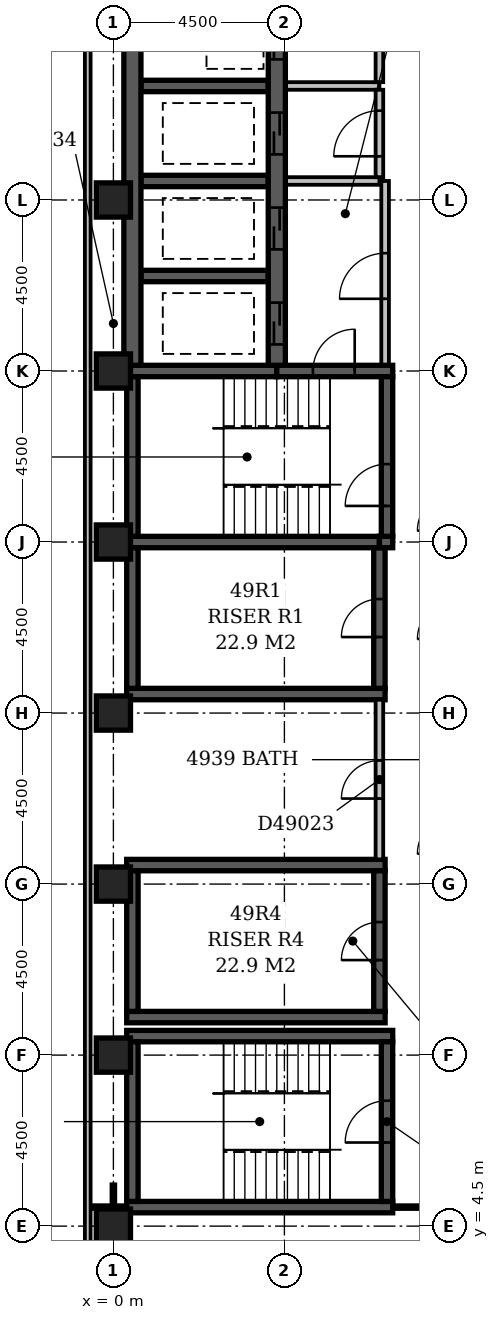
"""IFC4 building model, lengths in metres.
Left out: names, types, materials, properties, quantities, classifications, styles, units other than length and angle.
Written with IfcOpenShell. Run it as: python <this file> out.ifc"""

import sys

from ifc_helpers import new_model, si_unit, direction, frame, frame_2d, origin, origin_2d, place, context, subcontext, project, spatial, rectangle, extrude, element, fill, save


model = new_model("IFC4")
c1 = context("Model", 3, precision=1e-05, world=origin(), true_north=direction((0.0, 1.0)))
c2 = subcontext(c1, "Body", "Model", "MODEL_VIEW")
j1 = project(units=[si_unit("LENGTHUNIT", "METRE"), si_unit("PLANEANGLEUNIT", "RADIAN")], contexts=[c1])
p1 = place(None, origin())
s1 = spatial("IfcSite", under=j1, at=p1, CompositionType="ELEMENT")
p2 = place(p1, origin())
s2 = spatial("IfcBuilding", under=s1, at=p2, CompositionType="ELEMENT")
p3 = place(p2, frame((0.0, 0.0, 193.4)))
s3 = spatial("IfcBuildingStorey", under=s2, at=p3, CompositionType="ELEMENT", Elevation=193.4)
for number, where, z_axis, x_axis in (
    (1, (0.35, 5.0, -0.3), (0.0, 0.0, 1.0), (1.0, 0.0, 0.0)),
    (2, (0.35, 9.5, -0.3), (0.0, 0.0, 1.0), (1.0, 0.0, 0.0)),
):
    element("IfcWall", number, at=place(p3, frame(where, z_axis=z_axis, x_axis=x_axis)), inside=s3, PredefinedType="SHEAR", context=c2, shape_type="SweptSolid", body=[
        extrude(rectangle(XDim=7.0, YDim=0.3, at=frame_2d((3.5, 0.0))), origin(), (0.0, 0.0, 1.0), 3.6),
    ])
for number, where, z_axis, x_axis in (
    (3, (0.35, 10.0, -0.3), (0.0, 0.0, 1.0), (1.0, 0.0, 0.0)),
    (4, (0.35, 14.0, -0.3), (0.0, 0.0, 1.0), (1.0, 0.0, 0.0)),
    (5, (0.35, 18.5, -0.3), (0.0, 0.0, 1.0), (1.0, 0.0, 0.0)),
):
    element("IfcWall", number, at=place(p3, frame(where, z_axis=z_axis, x_axis=x_axis)), inside=s3, PredefinedType="SHEAR", context=c2, shape_type="SweptSolid", body=[
        extrude(rectangle(XDim=6.8, YDim=0.3, at=frame_2d((3.4, 0.0))), origin(), (0.0, 0.0, 1.0), 3.6),
    ])
p4 = place(p3, frame((0.35, 22.5, -0.3), z_axis=(0.0, 0.0, 1.0), x_axis=(1.0, 0.0, 0.0)))
e6 = element("IfcWall", 6, at=p4, inside=s3, PredefinedType="SHEAR", context=c2, shape_type="SweptSolid", body=[
    extrude(rectangle(XDim=6.65, YDim=0.3, at=frame_2d((3.325, 0.0))), origin(), (0.0, 0.0, 1.0), 3.6),
])
p5 = place(p3, frame((0.35, 27.0, -0.3), z_axis=(0.0, 0.0, 1.0), x_axis=(1.0, 0.0, 0.0)))
e7 = element("IfcWall", 7, at=p5, inside=s3, PredefinedType="SHEAR", context=c2, shape_type="SweptSolid", body=[
    extrude(rectangle(XDim=3.95, YDim=0.3, at=frame_2d((1.975, 0.0))), origin(), (0.0, 0.0, 1.0), 3.6),
])
p6 = place(p3, frame((0.5, 5.15, -0.3), z_axis=(0.0, 0.0, 1.0), x_axis=(0.0, 1.0, 0.0)))
e8 = element("IfcWall", 8, at=p6, inside=s3, PredefinedType="SHEAR", context=c2, shape_type="SweptSolid", body=[
    extrude(rectangle(XDim=4.2, YDim=0.3, at=frame_2d((2.1, 0.0))), origin(), (0.0, 0.0, 1.0), 3.6),
])
for number, where, z_axis, x_axis in (
    (9, (0.5, 10.15, -0.3), (0.0, 0.0, 1.0), (0.0, 1.0, 0.0)),
    (10, (0.5, 18.65, -0.3), (0.0, 0.0, 1.0), (0.0, 1.0, 0.0)),
):
    element("IfcWall", number, at=place(p3, frame(where, z_axis=z_axis, x_axis=x_axis)), inside=s3, PredefinedType="SHEAR", context=c2, shape_type="SweptSolid", body=[
        extrude(rectangle(XDim=3.7, YDim=0.3, at=frame_2d((1.85, 0.0))), origin(), (0.0, 0.0, 1.0), 3.6),
    ])
p7 = place(p3, frame((0.5, 22.65, -0.3), z_axis=(0.0, 0.0, 1.0), x_axis=(0.0, 1.0, 0.0)))
e11 = element("IfcWall", 11, at=p7, inside=s3, PredefinedType="SHEAR", context=c2, shape_type="SweptSolid", body=[
    extrude(rectangle(XDim=4.2, YDim=0.3, at=frame_2d((2.1, 0.0))), origin(), (0.0, 0.0, 1.0), 3.6),
])
p8 = place(p3, frame((0.5, 27.15, -0.3), z_axis=(0.0, 0.0, 1.0), x_axis=(0.0, 1.0, 0.0)))
e12 = element("IfcWall", 12, at=p8, inside=s3, PredefinedType="SHEAR", context=c2, shape_type="SweptSolid", body=[
    extrude(rectangle(XDim=22.125, YDim=0.45, at=frame_2d((11.062, 0.0))), origin(), (0.0, 0.0, 1.0), 3.6),
])
for number, where, z_axis, x_axis in (
    (13, (0.725, 29.5, -0.3), (0.0, 0.0, 1.0), (1.0, 0.0, 0.0)),
    (14, (0.725, 32.0, -0.3), (0.0, 0.0, 1.0), (1.0, 0.0, 0.0)),
    (15, (0.725, 34.5, -0.3), (0.0, 0.0, 1.0), (1.0, 0.0, 0.0)),
):
    element("IfcWall", number, at=place(p3, frame(where, z_axis=z_axis, x_axis=x_axis)), inside=s3, PredefinedType="SHEAR", context=c2, shape_type="SweptSolid", body=[
        extrude(rectangle(XDim=3.35, YDim=0.3, at=frame_2d((1.675, 0.0))), origin(), (0.0, 0.0, 1.0), 3.6),
    ])
p9 = place(p3, frame((4.3, 27.0, -0.3), z_axis=(0.0, 0.0, 1.0), x_axis=(1.0, 0.0, 0.0)))
e16 = element("IfcWall", 16, at=p9, inside=s3, PredefinedType="SHEAR", context=c2, shape_type="SweptSolid", body=[
    extrude(rectangle(XDim=3.05, YDim=0.3, at=frame_2d((1.525, 0.0))), origin(), (0.0, 0.0, 1.0), 3.6),
])
p10 = place(p9, frame((0.95, 0.0, 0.3)))
e17 = element("IfcOpeningElement", 17, at=p10, cuts=e16, PredefinedType="OPENING", context=c2, shape_type="SweptSolid", body=[
    extrude(rectangle(XDim=1.1, YDim=2.1, at=frame_2d((0.55, 1.05))), frame((0.0, 0.162, 0.0), z_axis=(0.0, -1.0, 0.0), x_axis=(1.0, 0.0, 0.0)), (0.0, 0.0, 1.0), 0.324),
])
p11 = place(p3, frame((4.3, 27.15, -0.3), z_axis=(0.0, 0.0, 1.0), x_axis=(0.0, 1.0, 0.0)))
e18 = element("IfcWall", 18, at=p11, inside=s3, PredefinedType="SHEAR", context=c2, shape_type="SweptSolid", body=[
    extrude(rectangle(XDim=22.125, YDim=0.45, at=frame_2d((11.062, 0.0))), origin(), (0.0, 0.0, 1.0), 3.6),
])
p12 = place(p11, frame((3.05, 0.0, 0.3)))
e19 = element("IfcOpeningElement", 19, at=p12, cuts=e18, PredefinedType="OPENING", context=c2, shape_type="SweptSolid", body=[
    extrude(rectangle(XDim=1.1, YDim=2.1, at=frame_2d((0.55, 1.05))), frame((0.0, 0.237, 0.0), z_axis=(0.0, -1.0, 0.0), x_axis=(1.0, 0.0, 0.0)), (0.0, 0.0, 1.0), 0.474),
])
p13 = place(p11, frame((0.55, 0.0, 0.3)))
e20 = element("IfcOpeningElement", 20, at=p13, cuts=e18, PredefinedType="OPENING", context=c2, shape_type="SweptSolid", body=[
    extrude(rectangle(XDim=1.1, YDim=2.1, at=frame_2d((0.55, 1.05))), frame((0.0, 0.237, 0.0), z_axis=(0.0, -1.0, 0.0), x_axis=(1.0, 0.0, 0.0)), (0.0, 0.0, 1.0), 0.474),
])
p14 = place(p11, frame((20.55, 0.0, 0.3)))
e21 = element("IfcOpeningElement", 21, at=p14, cuts=e18, PredefinedType="OPENING", context=c2, shape_type="SweptSolid", body=[
    extrude(rectangle(XDim=1.1, YDim=2.1, at=frame_2d((0.55, 1.05))), frame((0.0, 0.237, 0.0), z_axis=(0.0, -1.0, 0.0), x_axis=(1.0, 0.0, 0.0)), (0.0, 0.0, 1.0), 0.474),
])
p15 = place(p11, frame((18.05, 0.0, 0.3)))
e22 = element("IfcOpeningElement", 22, at=p15, cuts=e18, PredefinedType="OPENING", context=c2, shape_type="SweptSolid", body=[
    extrude(rectangle(XDim=1.1, YDim=2.1, at=frame_2d((0.55, 1.05))), frame((0.0, 0.237, 0.0), z_axis=(0.0, -1.0, 0.0), x_axis=(1.0, 0.0, 0.0)), (0.0, 0.0, 1.0), 0.474),
])
p16 = place(p11, frame((15.55, 0.0, 0.3)))
e23 = element("IfcOpeningElement", 23, at=p16, cuts=e18, PredefinedType="OPENING", context=c2, shape_type="SweptSolid", body=[
    extrude(rectangle(XDim=1.1, YDim=2.1, at=frame_2d((0.55, 1.05))), frame((0.0, 0.237, 0.0), z_axis=(0.0, -1.0, 0.0), x_axis=(1.0, 0.0, 0.0)), (0.0, 0.0, 1.0), 0.474),
])
p17 = place(p11, frame((13.05, 0.0, 0.3)))
e24 = element("IfcOpeningElement", 24, at=p17, cuts=e18, PredefinedType="OPENING", context=c2, shape_type="SweptSolid", body=[
    extrude(rectangle(XDim=1.1, YDim=2.1, at=frame_2d((0.55, 1.05))), frame((0.0, 0.237, 0.0), z_axis=(0.0, -1.0, 0.0), x_axis=(1.0, 0.0, 0.0)), (0.0, 0.0, 1.0), 0.474),
])
p18 = place(p11, frame((10.55, 0.0, 0.3)))
e25 = element("IfcOpeningElement", 25, at=p18, cuts=e18, PredefinedType="OPENING", context=c2, shape_type="SweptSolid", body=[
    extrude(rectangle(XDim=1.1, YDim=2.1, at=frame_2d((0.55, 1.05))), frame((0.0, 0.237, 0.0), z_axis=(0.0, -1.0, 0.0), x_axis=(1.0, 0.0, 0.0)), (0.0, 0.0, 1.0), 0.474),
])
p19 = place(p11, frame((8.05, 0.0, 0.3)))
e26 = element("IfcOpeningElement", 26, at=p19, cuts=e18, PredefinedType="OPENING", context=c2, shape_type="SweptSolid", body=[
    extrude(rectangle(XDim=1.1, YDim=2.1, at=frame_2d((0.55, 1.05))), frame((0.0, 0.237, 0.0), z_axis=(0.0, -1.0, 0.0), x_axis=(1.0, 0.0, 0.0)), (0.0, 0.0, 1.0), 0.474),
])
p20 = place(p11, frame((5.55, 0.0, 0.3)))
e27 = element("IfcOpeningElement", 27, at=p20, cuts=e18, PredefinedType="OPENING", context=c2, shape_type="SweptSolid", body=[
    extrude(rectangle(XDim=1.1, YDim=2.1, at=frame_2d((0.55, 1.05))), frame((0.0, 0.237, 0.0), z_axis=(0.0, -1.0, 0.0), x_axis=(1.0, 0.0, 0.0)), (0.0, 0.0, 1.0), 0.474),
])
p21 = place(p3, frame((7.0, 10.15, -0.3), z_axis=(0.0, 0.0, 1.0), x_axis=(0.0, 1.0, 0.0)))
e28 = element("IfcWall", 28, at=p21, inside=s3, PredefinedType="SHEAR", context=c2, shape_type="SweptSolid", body=[
    extrude(rectangle(XDim=3.7, YDim=0.3, at=frame_2d((1.85, 0.0))), origin(), (0.0, 0.0, 1.0), 3.6),
])
p22 = place(p21, frame((1.35, 0.0, 0.3)))
e29 = element("IfcOpeningElement", 29, at=p22, cuts=e28, PredefinedType="OPENING", context=c2, shape_type="SweptSolid", body=[
    extrude(rectangle(XDim=1.0, YDim=2.1, at=frame_2d((0.5, 1.05))), frame((0.0, 0.162, 0.0), z_axis=(0.0, -1.0, 0.0), x_axis=(1.0, 0.0, 0.0)), (0.0, 0.0, 1.0), 0.324),
])
p23 = place(p3, frame((7.0, 18.65, -0.3), z_axis=(0.0, 0.0, 1.0), x_axis=(0.0, 1.0, 0.0)))
e30 = element("IfcWall", 30, at=p23, inside=s3, PredefinedType="SHEAR", context=c2, shape_type="SweptSolid", body=[
    extrude(rectangle(XDim=3.7, YDim=0.3, at=frame_2d((1.85, 0.0))), origin(), (0.0, 0.0, 1.0), 3.6),
])
p24 = place(p23, frame((1.35, 0.0, 0.3)))
e31 = element("IfcOpeningElement", 31, at=p24, cuts=e30, PredefinedType="OPENING", context=c2, shape_type="SweptSolid", body=[
    extrude(rectangle(XDim=1.0, YDim=2.1, at=frame_2d((0.5, 1.05))), frame((0.0, 0.162, 0.0), z_axis=(0.0, -1.0, 0.0), x_axis=(1.0, 0.0, 0.0)), (0.0, 0.0, 1.0), 0.324),
])
p25 = place(p3, frame((7.0, 22.5, -0.3), z_axis=(0.0, 0.0, 1.0), x_axis=(1.0, 0.0, 0.0)))
e32 = element("IfcWall", 32, at=p25, inside=s3, PredefinedType="SHEAR", context=c2, shape_type="SweptSolid", body=[
    extrude(rectangle(XDim=0.35, YDim=0.3, at=frame_2d((0.175, 0.0))), origin(), (0.0, 0.0, 1.0), 3.6),
])
p26 = place(p3, frame((7.2, 5.15, -0.3), z_axis=(0.0, 0.0, 1.0), x_axis=(0.0, 1.0, 0.0)))
e33 = element("IfcWall", 33, at=p26, inside=s3, PredefinedType="SHEAR", context=c2, shape_type="SweptSolid", body=[
    extrude(rectangle(XDim=4.2, YDim=0.3, at=frame_2d((2.1, 0.0))), origin(), (0.0, 0.0, 1.0), 3.6),
])
p27 = place(p26, frame((1.55, 0.0, 0.3)))
e34 = element("IfcOpeningElement", 34, at=p27, cuts=e33, PredefinedType="OPENING", context=c2, shape_type="SweptSolid", body=[
    extrude(rectangle(XDim=1.1, YDim=2.1, at=frame_2d((0.55, 1.05))), frame((0.0, 0.162, 0.0), z_axis=(0.0, -1.0, 0.0), x_axis=(1.0, 0.0, 0.0)), (0.0, 0.0, 1.0), 0.324),
])
p28 = place(p3, frame((7.2, 22.65, -0.3), z_axis=(0.0, 0.0, 1.0), x_axis=(0.0, 1.0, 0.0)))
e35 = element("IfcWall", 35, at=p28, inside=s3, PredefinedType="SHEAR", context=c2, shape_type="SweptSolid", body=[
    extrude(rectangle(XDim=4.2, YDim=0.3, at=frame_2d((2.1, 0.0))), origin(), (0.0, 0.0, 1.0), 3.6),
])
p29 = place(p28, frame((0.8, 0.0, 0.3)))
e36 = element("IfcOpeningElement", 36, at=p29, cuts=e35, PredefinedType="OPENING", context=c2, shape_type="SweptSolid", body=[
    extrude(rectangle(XDim=1.1, YDim=2.1, at=frame_2d((0.55, 1.05))), frame((0.0, 0.162, 0.0), z_axis=(0.0, -1.0, 0.0), x_axis=(1.0, 0.0, 0.0)), (0.0, 0.0, 1.0), 0.324),
])
for number, where, z_axis, x_axis in (
    (37, (0.0, 4.5, -0.3), (0.0, 0.0, 1.0), (1.0, 0.0, 0.0)),
    (38, (0.0, 9.0, -0.3), (0.0, 0.0, 1.0), (1.0, 0.0, 0.0)),
    (39, (0.0, 13.5, -0.3), (0.0, 0.0, 1.0), (1.0, 0.0, 0.0)),
    (40, (0.0, 18.0, -0.3), (0.0, 0.0, 1.0), (1.0, 0.0, 0.0)),
    (41, (0.0, 22.5, -0.3), (0.0, 0.0, 1.0), (1.0, 0.0, 0.0)),
    (42, (0.0, 27.0, -0.3), (0.0, 0.0, 1.0), (1.0, 0.0, 0.0)),
    (43, (0.0, 31.5, -0.3), (0.0, 0.0, 1.0), (1.0, 0.0, 0.0)),
):
    element("IfcColumn", number, at=place(p3, frame(where, z_axis=z_axis, x_axis=x_axis)), inside=s3, PredefinedType="COLUMN", context=c2, shape_type="SweptSolid", body=[
        extrude(rectangle(XDim=0.9, YDim=0.9, at=origin_2d()), origin(), (0.0, 0.0, 1.0), 3.6),
    ])
p30 = place(p3, frame((-0.675, 59.1, 0.0), z_axis=(0.0, 0.0, 1.0), x_axis=(0.0, -1.0, 0.0)))
e44 = element("IfcWall", 44, at=p30, inside=s3, PredefinedType="STANDARD", context=c2, shape_type="SweptSolid", body=[
    extrude(rectangle(XDim=55.35, YDim=0.15, at=frame_2d((27.675, 0.0))), origin(), (0.0, 0.0, 1.0), 2.7),
])
p31 = place(p3, frame((4.545, 34.5, 0.0), z_axis=(0.0, 0.0, 1.0), x_axis=(1.0, 0.0, 0.0)))
e45 = element("IfcWall", 45, at=p31, inside=s3, PredefinedType="PARTITIONING", context=c2, shape_type="SweptSolid", body=[
    extrude(rectangle(XDim=2.455, YDim=0.2, at=frame_2d((1.228, 0.0))), origin(), (0.0, 0.0, 1.0), 3.3),
])
p32 = place(p3, frame((7.0, 34.6, 0.0), z_axis=(0.0, 0.0, 1.0), x_axis=(0.0, 1.0, 0.0)))
e46 = element("IfcWall", 46, at=p32, inside=s3, PredefinedType="PARTITIONING", context=c2, shape_type="SweptSolid", body=[
    extrude(rectangle(XDim=14.9, YDim=0.2, at=frame_2d((7.45, 0.0))), origin(), (0.0, 0.0, 1.0), 3.3),
])
p33 = place(p32, frame((2.8, 0.0, 0.0)))
e47 = element("IfcOpeningElement", 47, at=p33, cuts=e46, PredefinedType="OPENING", context=c2, shape_type="SweptSolid", body=[
    extrude(rectangle(XDim=1.2, YDim=2.1, at=frame_2d((0.6, 1.05))), frame((0.0, 0.112, 0.0), z_axis=(0.0, -1.0, 0.0), x_axis=(1.0, 0.0, 0.0)), (0.0, 0.0, 1.0), 0.224),
])
p34 = place(p32, frame((9.8, 0.0, 0.0)))
e48 = element("IfcOpeningElement", 48, at=p34, cuts=e46, PredefinedType="OPENING", context=c2, shape_type="SweptSolid", body=[
    extrude(rectangle(XDim=1.2, YDim=2.1, at=frame_2d((0.6, 1.05))), frame((0.0, 0.112, 0.0), z_axis=(0.0, -1.0, 0.0), x_axis=(1.0, 0.0, 0.0)), (0.0, 0.0, 1.0), 0.224),
])
p35 = place(p3, frame((4.545, 32.0, 0.0), z_axis=(0.0, 0.0, 1.0), x_axis=(1.0, 0.0, 0.0)))
e49 = element("IfcWall", 49, at=p35, inside=s3, PredefinedType="PARTITIONING", context=c2, shape_type="SweptSolid", body=[
    extrude(rectangle(XDim=2.455, YDim=0.2, at=frame_2d((1.228, 0.0))), origin(), (0.0, 0.0, 1.0), 3.3),
])
p36 = place(p3, frame((7.0, 32.1, 0.0), z_axis=(0.0, 0.0, 1.0), x_axis=(0.0, 1.0, 0.0)))
e50 = element("IfcWall", 50, at=p36, inside=s3, PredefinedType="PARTITIONING", context=c2, shape_type="SweptSolid", body=[
    extrude(rectangle(XDim=2.3, YDim=0.2, at=frame_2d((1.15, 0.0))), origin(), (0.0, 0.0, 1.0), 3.3),
])
p37 = place(p36, frame((0.55, 0.0, 0.0)))
e51 = element("IfcOpeningElement", 51, at=p37, cuts=e50, PredefinedType="OPENING", context=c2, shape_type="SweptSolid", body=[
    extrude(rectangle(XDim=1.2, YDim=2.1, at=frame_2d((0.6, 1.05))), frame((0.0, 0.112, 0.0), z_axis=(0.0, -1.0, 0.0), x_axis=(1.0, 0.0, 0.0)), (0.0, 0.0, 1.0), 0.224),
])
p38 = place(p3, frame((7.15, 27.17, 0.0), z_axis=(0.0, 0.0, 1.0), x_axis=(0.0, 1.0, 0.0)))
e52 = element("IfcWall", 52, at=p38, inside=s3, PredefinedType="PARTITIONING", context=c2, shape_type="SweptSolid", body=[
    extrude(rectangle(XDim=4.83, YDim=0.2, at=frame_2d((2.415, 0.0))), origin(), (0.0, 0.0, 1.0), 3.3),
])
p39 = place(p38, frame((1.73, 0.0, 0.0)))
e53 = element("IfcOpeningElement", 53, at=p39, cuts=e52, PredefinedType="OPENING", context=c2, shape_type="SweptSolid", body=[
    extrude(rectangle(XDim=1.2, YDim=2.1, at=frame_2d((0.6, 1.05))), frame((0.0, 0.112, 0.0), z_axis=(0.0, -1.0, 0.0), x_axis=(1.0, 0.0, 0.0)), (0.0, 0.0, 1.0), 0.224),
])
p40 = place(p3, frame((0.0, 4.95, 0.0), z_axis=(0.0, 0.0, 1.0), x_axis=(0.0, 1.0, 0.0)))
e54 = element("IfcWall", 54, at=p40, inside=s3, PredefinedType="PARTITIONING", context=c2, shape_type="SweptSolid", body=[
    extrude(rectangle(XDim=0.65, YDim=0.1, at=frame_2d((0.325, 0.0))), origin(), (0.0, 0.0, 1.0), 2.7),
])
p41 = place(p3, frame((-0.6, 5.0, 0.0), z_axis=(0.0, 0.0, 1.0), x_axis=(1.0, 0.0, 0.0)))
e55 = element("IfcWall", 55, at=p41, inside=s3, PredefinedType="PARTITIONING", context=c2, shape_type="SweptSolid", body=[
    extrude(rectangle(XDim=0.951, YDim=0.1, at=frame_2d((0.476, 0.0))), origin(), (0.0, 0.0, 1.0), 3.3),
])
p42 = place(p3, frame((7.349, 5.0, 0.0), z_axis=(0.0, 0.0, 1.0), x_axis=(1.0, 0.0, 0.0)))
e56 = element("IfcWall", 56, at=p42, inside=s3, PredefinedType="PARTITIONING", context=c2, shape_type="SweptSolid", body=[
    extrude(rectangle(XDim=1.551, YDim=0.1, at=frame_2d((0.775, 0.0))), origin(), (0.0, 0.0, 1.0), 3.3),
])
p43 = place(p3, frame((7.0, 14.15, 0.0), z_axis=(0.0, 0.0, 1.0), x_axis=(0.0, 1.0, 0.0)))
e57 = element("IfcWall", 57, at=p43, inside=s3, PredefinedType="PARTITIONING", context=c2, shape_type="SweptSolid", body=[
    extrude(rectangle(XDim=4.2, YDim=0.2, at=frame_2d((2.1, 0.0))), origin(), (0.0, 0.0, 1.0), 3.3),
])
p44 = place(p43, frame((1.6, 0.0, 0.0)))
e58 = element("IfcOpeningElement", 58, at=p44, cuts=e57, PredefinedType="OPENING", context=c2, shape_type="SweptSolid", body=[
    extrude(rectangle(XDim=1.0, YDim=2.1, at=frame_2d((0.5, 1.05))), frame((0.0, 0.112, 0.0), z_axis=(0.0, -1.0, 0.0), x_axis=(1.0, 0.0, 0.0)), (0.0, 0.0, 1.0), 0.224),
])
p45 = place(p39, origin())
e59 = element("IfcDoor", 59, at=p45, inside=s3, OperationType="SINGLE_SWING_LEFT", PredefinedType="DOOR", context=c2, shape_type="SweptSolid", body=[
    extrude(rectangle(XDim=1.2, YDim=2.1, at=frame_2d((0.6, 1.05))), frame((0.0, 0.025, 0.0), z_axis=(0.0, -1.0, 0.0), x_axis=(1.0, 0.0, 0.0)), (0.0, 0.0, 1.0), 0.05),
])
fill(e53, e59)
p46 = place(p12, origin())
e60 = element("IfcDoor", 60, at=p46, inside=s3, OperationType="SLIDING_TO_LEFT", PredefinedType="DOOR", context=c2, shape_type="SweptSolid", body=[
    extrude(rectangle(XDim=1.1, YDim=2.1, at=frame_2d((0.55, 1.05))), frame((0.0, 0.025, 0.0), z_axis=(0.0, -1.0, 0.0), x_axis=(1.0, 0.0, 0.0)), (0.0, 0.0, 1.0), 0.05),
])
fill(e19, e60)
p47 = place(p13, origin())
e61 = element("IfcDoor", 61, at=p47, inside=s3, OperationType="SLIDING_TO_LEFT", PredefinedType="DOOR", context=c2, shape_type="SweptSolid", body=[
    extrude(rectangle(XDim=1.1, YDim=2.1, at=frame_2d((0.55, 1.05))), frame((0.0, 0.025, 0.0), z_axis=(0.0, -1.0, 0.0), x_axis=(1.0, 0.0, 0.0)), (0.0, 0.0, 1.0), 0.05),
])
fill(e20, e61)
p48 = place(p19, origin())
e62 = element("IfcDoor", 62, at=p48, inside=s3, OperationType="SLIDING_TO_LEFT", PredefinedType="DOOR", context=c2, shape_type="SweptSolid", body=[
    extrude(rectangle(XDim=1.1, YDim=2.1, at=frame_2d((0.55, 1.05))), frame((0.0, 0.025, 0.0), z_axis=(0.0, -1.0, 0.0), x_axis=(1.0, 0.0, 0.0)), (0.0, 0.0, 1.0), 0.05),
])
fill(e26, e62)
p49 = place(p37, origin())
e63 = element("IfcDoor", 63, at=p49, inside=s3, OperationType="SINGLE_SWING_LEFT", PredefinedType="DOOR", context=c2, shape_type="SweptSolid", body=[
    extrude(rectangle(XDim=1.2, YDim=2.1, at=frame_2d((0.6, 1.05))), frame((0.0, 0.025, 0.0), z_axis=(0.0, -1.0, 0.0), x_axis=(1.0, 0.0, 0.0)), (0.0, 0.0, 1.0), 0.05),
])
fill(e51, e63)
p50 = place(p20, origin())
e64 = element("IfcDoor", 64, at=p50, inside=s3, OperationType="SLIDING_TO_LEFT", PredefinedType="DOOR", context=c2, shape_type="SweptSolid", body=[
    extrude(rectangle(XDim=1.1, YDim=2.1, at=frame_2d((0.55, 1.05))), frame((0.0, 0.025, 0.0), z_axis=(0.0, -1.0, 0.0), x_axis=(1.0, 0.0, 0.0)), (0.0, 0.0, 1.0), 0.05),
])
fill(e27, e64)
p51 = place(p24, origin())
e65 = element("IfcDoor", 65, at=p51, inside=s3, OperationType="SINGLE_SWING_LEFT", PredefinedType="DOOR", context=c2, shape_type="SweptSolid", body=[
    extrude(rectangle(XDim=1.0, YDim=2.1, at=frame_2d((0.5, 1.05))), frame((0.0, 0.025, 0.0), z_axis=(0.0, -1.0, 0.0), x_axis=(1.0, 0.0, 0.0)), (0.0, 0.0, 1.0), 0.05),
])
fill(e31, e65)
p52 = place(p22, origin())
e66 = element("IfcDoor", 66, at=p52, inside=s3, OperationType="SINGLE_SWING_LEFT", PredefinedType="DOOR", context=c2, shape_type="SweptSolid", body=[
    extrude(rectangle(XDim=1.0, YDim=2.1, at=frame_2d((0.5, 1.05))), frame((0.0, 0.025, 0.0), z_axis=(0.0, -1.0, 0.0), x_axis=(1.0, 0.0, 0.0)), (0.0, 0.0, 1.0), 0.05),
])
fill(e29, e66)
p53 = place(p10, frame((1.1, 0.0, 0.0), z_axis=(0.0, 0.0, 1.0), x_axis=(-1.0, 0.0, 0.0)))
e67 = element("IfcDoor", 67, at=p53, inside=s3, OperationType="SINGLE_SWING_LEFT", PredefinedType="DOOR", context=c2, shape_type="SweptSolid", body=[
    extrude(rectangle(XDim=1.1, YDim=2.1, at=frame_2d((0.55, 1.05))), frame((0.0, 0.025, 0.0), z_axis=(0.0, -1.0, 0.0), x_axis=(1.0, 0.0, 0.0)), (0.0, 0.0, 1.0), 0.05),
])
fill(e17, e67)
p54 = place(p29, origin())
e68 = element("IfcDoor", 68, at=p54, inside=s3, OperationType="SINGLE_SWING_LEFT", PredefinedType="DOOR", context=c2, shape_type="SweptSolid", body=[
    extrude(rectangle(XDim=1.1, YDim=2.1, at=frame_2d((0.55, 1.05))), frame((0.0, 0.025, 0.0), z_axis=(0.0, -1.0, 0.0), x_axis=(1.0, 0.0, 0.0)), (0.0, 0.0, 1.0), 0.05),
])
fill(e36, e68)
p55 = place(p27, origin())
e69 = element("IfcDoor", 69, at=p55, inside=s3, OperationType="SINGLE_SWING_LEFT", PredefinedType="DOOR", context=c2, shape_type="SweptSolid", body=[
    extrude(rectangle(XDim=1.1, YDim=2.1, at=frame_2d((0.55, 1.05))), frame((0.0, 0.025, 0.0), z_axis=(0.0, -1.0, 0.0), x_axis=(1.0, 0.0, 0.0)), (0.0, 0.0, 1.0), 0.05),
])
fill(e34, e69)
p56 = place(p44, origin())
e70 = element("IfcDoor", 70, at=p56, inside=s3, OperationType="SINGLE_SWING_LEFT", PredefinedType="DOOR", context=c2, shape_type="SweptSolid", body=[
    extrude(rectangle(XDim=1.0, YDim=2.1, at=frame_2d((0.5, 1.05))), frame((0.0, 0.025, 0.0), z_axis=(0.0, -1.0, 0.0), x_axis=(1.0, 0.0, 0.0)), (0.0, 0.0, 1.0), 0.05),
])
fill(e58, e70)
save(model, sys.argv[1])
